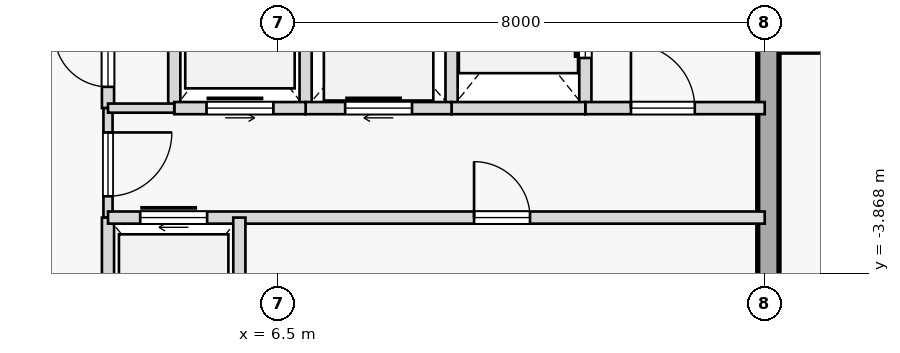
"""IFC4 building model, lengths in metres.
Left out: names, types, materials, properties, quantities, classifications, styles, units other than length and angle.
Written with IfcOpenShell. Run it as: python <this file> out.ifc"""

import sys

from ifc_helpers import new_model, si_unit, direction, frame, frame_2d, origin, place, context, subcontext, project, spatial, rectangle, extrude, element, fill, save


model = new_model("IFC4")
c1 = context("Model", 3, precision=1e-05, world=origin(), true_north=direction((0.0, 1.0)))
c2 = subcontext(c1, "Body", "Model", "MODEL_VIEW")
j1 = project(units=[si_unit("LENGTHUNIT", "METRE"), si_unit("PLANEANGLEUNIT", "RADIAN")], contexts=[c1])
p1 = place(None, origin())
s1 = spatial("IfcSite", under=j1, at=p1, CompositionType="ELEMENT")
p2 = place(p1, origin())
s2 = spatial("IfcBuilding", under=s1, at=p2, CompositionType="ELEMENT")
p3 = place(p2, frame((0.0, 0.0, 220.95)))
s3 = spatial("IfcBuildingStorey", under=s2, at=p3, CompositionType="ELEMENT", Elevation=220.95)
p4 = place(p3, frame((14.56, -5.425, 0.0), z_axis=(0.0, 0.0, 1.0), x_axis=(0.0, 1.0, 0.0)))
e1 = element("IfcWall", 1, at=p4, inside=s3, PredefinedType="SHEAR", context=c2, shape_type="SweptSolid", body=[
    extrude(rectangle(XDim=10.85, YDim=0.35, at=frame_2d((5.425, 0.0))), origin(), (0.0, 0.0, 1.0), 3.125),
])
p5 = place(p3, frame((3.7, -1.15, 0.0), z_axis=(0.0, 0.0, 1.0), x_axis=(0.0, 1.0, 0.0)))
e2 = element("IfcWall", 2, at=p5, inside=s3, PredefinedType="STANDARD", context=c2, shape_type="SweptSolid", body=[
    extrude(rectangle(XDim=6.75, YDim=0.2, at=frame_2d((3.375, 0.0))), origin(), (0.0, 0.0, 1.0), 3.125),
])
p6 = place(p5, frame((0.35, 0.0, 0.0)))
e3 = element("IfcOpeningElement", 3, at=p6, cuts=e2, PredefinedType="OPENING", context=c2, shape_type="SweptSolid", body=[
    extrude(rectangle(XDim=0.88, YDim=2.15, at=frame_2d((0.44, 1.075))), frame((0.0, 0.11, 0.0), z_axis=(0.0, -1.0, 0.0), x_axis=(1.0, 0.0, 0.0)), (0.0, 0.0, 1.0), 0.22),
])
p7 = place(p5, frame((2.55, 0.0, 0.0)))
e4 = element("IfcOpeningElement", 4, at=p7, cuts=e2, PredefinedType="OPENING", context=c2, shape_type="SweptSolid", body=[
    extrude(rectangle(XDim=0.92, YDim=2.15, at=frame_2d((0.46, 1.075))), frame((0.0, 0.11, 0.0), z_axis=(0.0, -1.0, 0.0), x_axis=(1.0, 0.0, 0.0)), (0.0, 0.0, 1.0), 0.22),
])
p8 = place(p5, frame((4.22, 0.0, 0.0)))
e5 = element("IfcOpeningElement", 5, at=p8, cuts=e2, PredefinedType="OPENING", context=c2, shape_type="SweptSolid", body=[
    extrude(rectangle(XDim=0.88, YDim=2.15, at=frame_2d((0.44, 1.075))), frame((0.0, 0.11, 0.0), z_axis=(0.0, -1.0, 0.0), x_axis=(1.0, 0.0, 0.0)), (0.0, 0.0, 1.0), 0.22),
])
p9 = place(p3, frame((3.7, -2.95, 0.0), z_axis=(0.0, 0.0, 1.0), x_axis=(0.0, 1.0, 0.0)))
e6 = element("IfcWall", 6, at=p9, inside=s3, PredefinedType="PARTITIONING", context=c2, shape_type="SweptSolid", body=[
    extrude(rectangle(XDim=1.8, YDim=0.15, at=frame_2d((0.9, 0.0))), origin(), (0.0, 0.0, 1.0), 3.125),
])
p10 = place(p9, frame((0.35, 0.0, 0.0)))
e7 = element("IfcOpeningElement", 7, at=p10, cuts=e6, PredefinedType="OPENING", context=c2, shape_type="SweptSolid", body=[
    extrude(rectangle(XDim=1.05, YDim=2.18, at=frame_2d((0.525, 1.09))), frame((0.0, 0.085, 0.0), z_axis=(0.0, -1.0, 0.0), x_axis=(1.0, 0.0, 0.0)), (0.0, 0.0, 1.0), 0.17),
])
p11 = place(p3, frame((3.7, -5.6, 0.0), z_axis=(0.0, 0.0, 1.0), x_axis=(0.0, 1.0, 0.0)))
e8 = element("IfcWall", 8, at=p11, inside=s3, PredefinedType="STANDARD", context=c2, shape_type="SweptSolid", body=[
    extrude(rectangle(XDim=2.65, YDim=0.2, at=frame_2d((1.325, 0.0))), origin(), (0.0, 0.0, 1.0), 3.125),
])
p12 = place(p3, frame((11.55, -1.15, 0.0), z_axis=(0.0, 0.0, 1.0), x_axis=(0.0, 1.0, 0.0)))
e9 = element("IfcWall", 9, at=p12, inside=s3, PredefinedType="STANDARD", context=c2, shape_type="SweptSolid", body=[
    extrude(rectangle(XDim=2.75, YDim=0.2, at=frame_2d((1.375, 0.0))), origin(), (0.0, 0.0, 1.0), 3.125),
])
p13 = place(p12, frame((0.825, 0.0, 0.0)))
e10 = element("IfcOpeningElement", 10, at=p13, cuts=e9, PredefinedType="OPENING", context=c2, shape_type="SweptSolid", body=[
    extrude(rectangle(XDim=1.1, YDim=2.15, at=frame_2d((0.55, 1.075))), frame((0.0, 0.11, 0.0), z_axis=(0.0, -1.0, 0.0), x_axis=(1.0, 0.0, 0.0)), (0.0, 0.0, 1.0), 0.22),
])
p14 = place(p3, frame((9.35, -1.15, 0.0), z_axis=(0.0, 0.0, 1.0), x_axis=(0.0, 1.0, 0.0)))
e11 = element("IfcWall", 11, at=p14, inside=s3, PredefinedType="STANDARD", context=c2, shape_type="SweptSolid", body=[
    extrude(rectangle(XDim=2.75, YDim=0.2, at=frame_2d((1.375, 0.0))), origin(), (0.0, 0.0, 1.0), 3.125),
])
p15 = place(p3, frame((11.55, -1.15, 0.0), z_axis=(0.0, 0.0, 1.0), x_axis=(1.0, 0.0, 0.0)))
e12 = element("IfcWall", 12, at=p15, inside=s3, PredefinedType="STANDARD", context=c2, shape_type="SweptSolid", body=[
    extrude(rectangle(XDim=2.95, YDim=0.2, at=frame_2d((1.475, 0.0))), origin(), (0.0, 0.0, 1.0), 3.125),
])
p16 = place(p15, frame((0.75, 0.0, 0.0)))
e13 = element("IfcOpeningElement", 13, at=p16, cuts=e12, PredefinedType="OPENING", context=c2, shape_type="SweptSolid", body=[
    extrude(rectangle(XDim=1.05, YDim=2.18, at=frame_2d((0.525, 1.09))), frame((0.0, 0.11, 0.0), z_axis=(0.0, -1.0, 0.0), x_axis=(1.0, 0.0, 0.0)), (0.0, 0.0, 1.0), 0.22),
])
p17 = place(p3, frame((9.35, -1.15, 0.0), z_axis=(0.0, 0.0, 1.0), x_axis=(1.0, 0.0, 0.0)))
e14 = element("IfcWall", 14, at=p17, inside=s3, PredefinedType="STANDARD", context=c2, shape_type="SweptSolid", body=[
    extrude(rectangle(XDim=2.2, YDim=0.2, at=frame_2d((1.1, 0.0))), origin(), (0.0, 0.0, 1.0), 3.125),
])
p18 = place(p3, frame((6.95, -1.15, 0.0), z_axis=(0.0, 0.0, 1.0), x_axis=(0.0, 1.0, 0.0)))
e15 = element("IfcWall", 15, at=p18, inside=s3, PredefinedType="STANDARD", context=c2, shape_type="SweptSolid", body=[
    extrude(rectangle(XDim=2.75, YDim=0.2, at=frame_2d((1.375, 0.0))), origin(), (0.0, 0.0, 1.0), 3.125),
])
p19 = place(p3, frame((6.95, -1.15, 0.0), z_axis=(0.0, 0.0, 1.0), x_axis=(1.0, 0.0, 0.0)))
e16 = element("IfcWall", 16, at=p19, inside=s3, PredefinedType="STANDARD", context=c2, shape_type="SweptSolid", body=[
    extrude(rectangle(XDim=2.4, YDim=0.2, at=frame_2d((1.2, 0.0))), origin(), (0.0, 0.0, 1.0), 3.125),
])
p20 = place(p19, frame((0.65, 0.0, 0.0)))
e17 = element("IfcOpeningElement", 17, at=p20, cuts=e16, PredefinedType="OPENING", context=c2, shape_type="SweptSolid", body=[
    extrude(rectangle(XDim=1.1, YDim=2.15, at=frame_2d((0.55, 1.075))), frame((0.0, 0.11, 0.0), z_axis=(0.0, -1.0, 0.0), x_axis=(1.0, 0.0, 0.0)), (0.0, 0.0, 1.0), 0.22),
])
p21 = place(p3, frame((4.79, -1.15, 0.0), z_axis=(0.0, 0.0, 1.0), x_axis=(0.0, 1.0, 0.0)))
e18 = element("IfcWall", 18, at=p21, inside=s3, PredefinedType="STANDARD", context=c2, shape_type="SweptSolid", body=[
    extrude(rectangle(XDim=2.75, YDim=0.2, at=frame_2d((1.375, 0.0))), origin(), (0.0, 0.0, 1.0), 3.125),
])
p22 = place(p3, frame((4.79, -1.15, 0.0), z_axis=(0.0, 0.0, 1.0), x_axis=(1.0, 0.0, 0.0)))
e19 = element("IfcWall", 19, at=p22, inside=s3, PredefinedType="STANDARD", context=c2, shape_type="SweptSolid", body=[
    extrude(rectangle(XDim=2.16, YDim=0.2, at=frame_2d((1.08, 0.0))), origin(), (0.0, 0.0, 1.0), 3.125),
])
p23 = place(p22, frame((0.53, 0.0, 0.0)))
e20 = element("IfcOpeningElement", 20, at=p23, cuts=e19, PredefinedType="OPENING", context=c2, shape_type="SweptSolid", body=[
    extrude(rectangle(XDim=1.1, YDim=2.15, at=frame_2d((0.55, 1.075))), frame((0.0, 0.11, 0.0), z_axis=(0.0, -1.0, 0.0), x_axis=(1.0, 0.0, 0.0)), (0.0, 0.0, 1.0), 0.22),
])
p24 = place(p3, frame((3.7, -1.15, 0.0), z_axis=(0.0, 0.0, 1.0), x_axis=(1.0, 0.0, 0.0)))
e21 = element("IfcWall", 21, at=p24, inside=s3, PredefinedType="PARTITIONING", context=c2, shape_type="SweptSolid", body=[
    extrude(rectangle(XDim=1.09, YDim=0.15, at=frame_2d((0.545, 0.0))), origin(), (0.0, 0.0, 1.0), 3.125),
])
p25 = place(p3, frame((3.7, -2.95, 0.0), z_axis=(0.0, 0.0, 1.0), x_axis=(1.0, 0.0, 0.0)))
e22 = element("IfcWall", 22, at=p25, inside=s3, PredefinedType="STANDARD", context=c2, shape_type="SweptSolid", body=[
    extrude(rectangle(XDim=10.8, YDim=0.2, at=frame_2d((5.4, 0.0))), origin(), (0.0, 0.0, 1.0), 3.125),
])
p26 = place(p25, frame((0.53, 0.0, 0.0)))
e23 = element("IfcOpeningElement", 23, at=p26, cuts=e22, PredefinedType="OPENING", context=c2, shape_type="SweptSolid", body=[
    extrude(rectangle(XDim=1.1, YDim=2.15, at=frame_2d((0.55, 1.075))), frame((0.0, 0.11, 0.0), z_axis=(0.0, -1.0, 0.0), x_axis=(1.0, 0.0, 0.0)), (0.0, 0.0, 1.0), 0.22),
])
p27 = place(p25, frame((6.02, 0.0, 0.0)))
e24 = element("IfcOpeningElement", 24, at=p27, cuts=e22, PredefinedType="OPENING", context=c2, shape_type="SweptSolid", body=[
    extrude(rectangle(XDim=0.92, YDim=2.15, at=frame_2d((0.46, 1.075))), frame((0.0, 0.11, 0.0), z_axis=(0.0, -1.0, 0.0), x_axis=(1.0, 0.0, 0.0)), (0.0, 0.0, 1.0), 0.22),
])
p28 = place(p3, frame((5.86, -5.6, 0.0), z_axis=(0.0, 0.0, 1.0), x_axis=(0.0, 1.0, 0.0)))
e25 = element("IfcWall", 25, at=p28, inside=s3, PredefinedType="STANDARD", context=c2, shape_type="SweptSolid", body=[
    extrude(rectangle(XDim=2.65, YDim=0.2, at=frame_2d((1.325, 0.0))), origin(), (0.0, 0.0, 1.0), 3.125),
])
p29 = place(p16, origin())
e26 = element("IfcDoor", 26, at=p29, inside=s3, OperationType="SINGLE_SWING_LEFT", PredefinedType="DOOR", context=c2, shape_type="SweptSolid", body=[
    extrude(rectangle(XDim=1.05, YDim=2.18, at=frame_2d((0.525, 1.09))), frame((0.0, 0.025, 0.0), z_axis=(0.0, -1.0, 0.0), x_axis=(1.0, 0.0, 0.0)), (0.0, 0.0, 1.0), 0.05),
])
fill(e13, e26)
p30 = place(p10, frame((1.05, 0.0, 0.0), z_axis=(0.0, 0.0, 1.0), x_axis=(-1.0, 0.0, 0.0)))
e27 = element("IfcDoor", 27, at=p30, inside=s3, OperationType="SINGLE_SWING_RIGHT", PredefinedType="DOOR", context=c2, shape_type="SweptSolid", body=[
    extrude(rectangle(XDim=1.05, YDim=2.18, at=frame_2d((0.525, 1.09))), frame((0.0, 0.025, 0.0), z_axis=(0.0, -1.0, 0.0), x_axis=(1.0, 0.0, 0.0)), (0.0, 0.0, 1.0), 0.05),
])
fill(e7, e27)
p31 = place(p13, origin())
e28 = element("IfcDoor", 28, at=p31, inside=s3, OperationType="SLIDING_TO_RIGHT", PredefinedType="DOOR", context=c2, shape_type="SweptSolid", body=[
    extrude(rectangle(XDim=1.1, YDim=2.15, at=frame_2d((0.55, 1.075))), frame((0.0, 0.025, 0.0), z_axis=(0.0, -1.0, 0.0), x_axis=(1.0, 0.0, 0.0)), (0.0, 0.0, 1.0), 0.05),
])
fill(e10, e28)
p32 = place(p20, origin())
e29 = element("IfcDoor", 29, at=p32, inside=s3, OperationType="SLIDING_TO_RIGHT", PredefinedType="DOOR", context=c2, shape_type="SweptSolid", body=[
    extrude(rectangle(XDim=1.1, YDim=2.15, at=frame_2d((0.55, 1.075))), frame((0.0, 0.025, 0.0), z_axis=(0.0, -1.0, 0.0), x_axis=(1.0, 0.0, 0.0)), (0.0, 0.0, 1.0), 0.05),
])
fill(e17, e29)
p33 = place(p23, origin())
e30 = element("IfcDoor", 30, at=p33, inside=s3, OperationType="SLIDING_TO_LEFT", PredefinedType="DOOR", context=c2, shape_type="SweptSolid", body=[
    extrude(rectangle(XDim=1.1, YDim=2.15, at=frame_2d((0.55, 1.075))), frame((0.0, 0.025, 0.0), z_axis=(0.0, -1.0, 0.0), x_axis=(1.0, 0.0, 0.0)), (0.0, 0.0, 1.0), 0.05),
])
fill(e20, e30)
p34 = place(p26, origin())
e31 = element("IfcDoor", 31, at=p34, inside=s3, OperationType="SLIDING_TO_RIGHT", PredefinedType="DOOR", context=c2, shape_type="SweptSolid", body=[
    extrude(rectangle(XDim=1.1, YDim=2.15, at=frame_2d((0.55, 1.075))), frame((0.0, 0.025, 0.0), z_axis=(0.0, -1.0, 0.0), x_axis=(1.0, 0.0, 0.0)), (0.0, 0.0, 1.0), 0.05),
])
fill(e23, e31)
p35 = place(p27, origin())
e32 = element("IfcDoor", 32, at=p35, inside=s3, OperationType="SINGLE_SWING_LEFT", PredefinedType="DOOR", context=c2, shape_type="SweptSolid", body=[
    extrude(rectangle(XDim=0.92, YDim=2.15, at=frame_2d((0.46, 1.075))), frame((0.0, 0.025, 0.0), z_axis=(0.0, -1.0, 0.0), x_axis=(1.0, 0.0, 0.0)), (0.0, 0.0, 1.0), 0.05),
])
fill(e24, e32)
p36 = place(p6, origin())
e33 = element("IfcDoor", 33, at=p36, inside=s3, OperationType="SINGLE_SWING_RIGHT", PredefinedType="DOOR", context=c2, shape_type="SweptSolid", body=[
    extrude(rectangle(XDim=0.88, YDim=2.15, at=frame_2d((0.44, 1.075))), frame((0.0, 0.025, 0.0), z_axis=(0.0, -1.0, 0.0), x_axis=(1.0, 0.0, 0.0)), (0.0, 0.0, 1.0), 0.05),
])
fill(e3, e33)
save(model, sys.argv[1])
